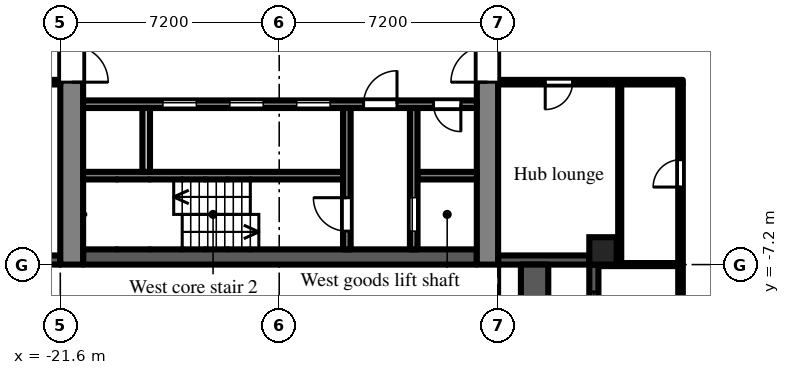
"""IFC4 building model, lengths in metres.
Left out: names, types, materials, properties, quantities, classifications, styles, units other than length and angle.
Written with IfcOpenShell. Run it as: python <this file> out.ifc"""

import sys

from ifc_helpers import new_model, si_unit, direction, frame, frame_2d, origin, origin_2d, place, context, subcontext, project, spatial, rectangle, extrude, element, fill, save


model = new_model("IFC4")
c1 = context("Model", 3, precision=1e-05, world=origin(), true_north=direction((0.0, 1.0)))
c2 = subcontext(c1, "Body", "Model", "MODEL_VIEW")
j1 = project(units=[si_unit("LENGTHUNIT", "METRE"), si_unit("PLANEANGLEUNIT", "RADIAN")], contexts=[c1])
p1 = place(None, origin())
s1 = spatial("IfcSite", under=j1, at=p1, CompositionType="ELEMENT")
p2 = place(p1, origin())
s2 = spatial("IfcBuilding", under=s1, at=p2, CompositionType="ELEMENT")
p3 = place(p2, frame((0.0, 0.0, 44.7)))
s3 = spatial("IfcBuildingStorey", under=s2, at=p3, CompositionType="ELEMENT", Elevation=44.7)
p4 = place(p3, frame((-3.75, -6.75, 0.0), z_axis=(0.0, 0.0, 1.0), x_axis=(1.0, 0.0, 0.0)))
e1 = element("IfcColumn", 1, at=p4, inside=s3, PredefinedType="COLUMN", context=c2, shape_type="SweptSolid", body=[
    extrude(rectangle(XDim=0.9, YDim=0.9, at=origin_2d()), origin(), (0.0, 0.0, 1.0), 3.0),
])
p5 = place(p3, frame((-24.3, -7.05, 0.0), z_axis=(0.0, 0.0, 1.0), x_axis=(1.0, 0.0, 0.0)))
e2 = element("IfcWall", 2, at=p5, inside=s3, PredefinedType="SOLIDWALL", context=c2, shape_type="SweptSolid", body=[
    extrude(rectangle(XDim=2.7, YDim=0.3, at=frame_2d((1.35, 0.0))), origin(), (0.0, 0.0, 1.0), 2.1),
])
p6 = place(p5, frame((0.75, 0.0, 0.2)))
e3 = element("IfcOpeningElement", 3, at=p6, cuts=e2, PredefinedType="OPENING", context=c2, shape_type="SweptSolid", body=[
    extrude(rectangle(XDim=1.2, YDim=1.85, at=frame_2d((0.6, 0.925))), frame((0.0, 0.16, 0.0), z_axis=(0.0, -1.0, 0.0), x_axis=(1.0, 0.0, 0.0)), (0.0, 0.0, 1.0), 0.32),
])
p7 = place(p3, frame((-7.2, -7.05, 0.0), z_axis=(0.0, 0.0, 1.0), x_axis=(1.0, 0.0, 0.0)))
e4 = element("IfcWall", 4, at=p7, inside=s3, PredefinedType="SOLIDWALL", context=c2, shape_type="SweptSolid", body=[
    extrude(rectangle(XDim=3.0, YDim=0.3, at=frame_2d((1.5, 0.0))), origin(), (0.0, 0.0, 1.0), 2.1),
])
p8 = place(p3, frame((-4.05, -7.2, 0.0), z_axis=(0.0, 0.0, 1.0), x_axis=(0.0, -1.0, 0.0)))
e5 = element("IfcWall", 5, at=p8, inside=s3, PredefinedType="SOLIDWALL", context=c2, shape_type="SweptSolid", body=[
    extrude(rectangle(XDim=7.2, YDim=0.3, at=frame_2d((3.6, 0.0))), origin(), (0.0, 0.0, 1.0), 2.1),
])
p9 = place(p8, frame((3.0, 0.0, 0.0)))
e6 = element("IfcOpeningElement", 6, at=p9, cuts=e5, PredefinedType="OPENING", context=c2, shape_type="SweptSolid", body=[
    extrude(rectangle(XDim=1.2, YDim=2.05, at=frame_2d((0.6, 1.025))), frame((0.0, 0.16, 0.0), z_axis=(0.0, -1.0, 0.0), x_axis=(1.0, 0.0, 0.0)), (0.0, 0.0, 1.0), 0.32),
])
p10 = place(p8, frame((0.9, 0.0, 0.2)))
e7 = element("IfcOpeningElement", 7, at=p10, cuts=e5, PredefinedType="OPENING", context=c2, shape_type="SweptSolid", body=[
    extrude(rectangle(XDim=1.8, YDim=1.85, at=frame_2d((0.9, 0.925))), frame((0.0, 0.16, 0.0), z_axis=(0.0, -1.0, 0.0), x_axis=(1.0, 0.0, 0.0)), (0.0, 0.0, 1.0), 0.32),
])
p11 = place(p8, frame((4.5, 0.0, 0.2)))
e8 = element("IfcOpeningElement", 8, at=p11, cuts=e5, PredefinedType="OPENING", context=c2, shape_type="SweptSolid", body=[
    extrude(rectangle(XDim=1.8, YDim=1.85, at=frame_2d((0.9, 0.925))), frame((0.0, 0.16, 0.0), z_axis=(0.0, -1.0, 0.0), x_axis=(1.0, 0.0, 0.0)), (0.0, 0.0, 1.0), 0.32),
])
p12 = place(p3, frame((-6.0, -14.4, 0.0), z_axis=(0.0, 0.0, 1.0), x_axis=(0.0, 1.0, 0.0)))
e9 = element("IfcWall", 9, at=p12, inside=s3, PredefinedType="PARAPET", context=c2, shape_type="SweptSolid", body=[
    extrude(rectangle(XDim=7.2, YDim=0.9, at=frame_2d((3.6, 0.0))), origin(), (0.0, 0.0, 1.0), 0.8),
])
p13 = place(p3, frame((-7.55, -7.2, 0.0), z_axis=(0.0, 0.0, 1.0), x_axis=(0.0, 1.0, 0.0)))
e10 = element("IfcWall", 10, at=p13, inside=s3, PredefinedType="SHEAR", context=c2, shape_type="SweptSolid", body=[
    extrude(rectangle(XDim=14.4, YDim=0.7, at=frame_2d((7.2, 0.0))), origin(), (0.0, 0.0, 1.0), 2.575),
])
p14 = place(p13, frame((6.0, 0.0, 0.0)))
e11 = element("IfcOpeningElement", 11, at=p14, cuts=e10, PredefinedType="OPENING", context=c2, shape_type="SweptSolid", body=[
    extrude(rectangle(XDim=2.4, YDim=2.2, at=frame_2d((1.2, 1.1))), frame((0.0, 0.36, 0.0), z_axis=(0.0, -1.0, 0.0), x_axis=(1.0, 0.0, 0.0)), (0.0, 0.0, 1.0), 0.72),
])
p15 = place(p3, frame((-21.225, -7.2, 0.0), z_axis=(0.0, 0.0, 1.0), x_axis=(0.0, 1.0, 0.0)))
e12 = element("IfcWall", 12, at=p15, inside=s3, PredefinedType="SHEAR", context=c2, shape_type="SweptSolid", body=[
    extrude(rectangle(XDim=14.4, YDim=0.75, at=frame_2d((7.2, 0.0))), origin(), (0.0, 0.0, 1.0), 2.575),
])
p16 = place(p15, frame((6.0, 0.0, 0.0)))
e13 = element("IfcOpeningElement", 13, at=p16, cuts=e12, PredefinedType="OPENING", context=c2, shape_type="SweptSolid", body=[
    extrude(rectangle(XDim=2.4, YDim=2.2, at=frame_2d((1.2, 1.1))), frame((0.0, 0.385, 0.0), z_axis=(0.0, -1.0, 0.0), x_axis=(1.0, 0.0, 0.0)), (0.0, 0.0, 1.0), 0.77),
])
p17 = place(p3, frame((-7.9, -6.95, 0.0), z_axis=(0.0, 0.0, 1.0), x_axis=(-1.0, 0.0, 0.0)))
e14 = element("IfcWall", 14, at=p17, inside=s3, PredefinedType="SHEAR", context=c2, shape_type="SweptSolid", body=[
    extrude(rectangle(XDim=12.95, YDim=0.5, at=frame_2d((6.475, 0.0))), origin(), (0.0, 0.0, 1.0), 2.575),
])
p18 = place(p3, frame((-7.9, -1.925, 0.0), z_axis=(0.0, 0.0, 1.0), x_axis=(-1.0, 0.0, 0.0)))
e15 = element("IfcWall", 15, at=p18, inside=s3, PredefinedType="SHEAR", context=c2, shape_type="SweptSolid", body=[
    extrude(rectangle(XDim=12.95, YDim=0.25, at=frame_2d((6.475, 0.0))), origin(), (0.0, 0.0, 1.0), 2.575),
])
p19 = place(p18, frame((4.825, 0.0, 0.0)))
e16 = element("IfcOpeningElement", 16, at=p19, cuts=e15, PredefinedType="OPENING", context=c2, shape_type="SweptSolid", body=[
    extrude(rectangle(XDim=1.1, YDim=2.1, at=frame_2d((0.55, 1.05))), frame((0.0, 0.135, 0.0), z_axis=(0.0, -1.0, 0.0), x_axis=(1.0, 0.0, 0.0)), (0.0, 0.0, 1.0), 0.27),
])
p20 = place(p18, frame((7.025, 0.0, 0.0)))
e17 = element("IfcOpeningElement", 17, at=p20, cuts=e15, PredefinedType="OPENING", context=c2, shape_type="SweptSolid", body=[
    extrude(rectangle(XDim=1.1, YDim=2.1, at=frame_2d((0.55, 1.05))), frame((0.0, 0.135, 0.0), z_axis=(0.0, -1.0, 0.0), x_axis=(1.0, 0.0, 0.0)), (0.0, 0.0, 1.0), 0.27),
])
p21 = place(p18, frame((9.225, 0.0, 0.0)))
e18 = element("IfcOpeningElement", 18, at=p21, cuts=e15, PredefinedType="OPENING", context=c2, shape_type="SweptSolid", body=[
    extrude(rectangle(XDim=1.1, YDim=2.1, at=frame_2d((0.55, 1.05))), frame((0.0, 0.135, 0.0), z_axis=(0.0, -1.0, 0.0), x_axis=(1.0, 0.0, 0.0)), (0.0, 0.0, 1.0), 0.27),
])
p22 = place(p18, frame((0.525, 0.0, 0.0)))
e19 = element("IfcOpeningElement", 19, at=p22, cuts=e15, PredefinedType="OPENING", context=c2, shape_type="SweptSolid", body=[
    extrude(rectangle(XDim=0.9, YDim=2.1, at=frame_2d((0.45, 1.05))), frame((0.0, 0.135, 0.0), z_axis=(0.0, -1.0, 0.0), x_axis=(1.0, 0.0, 0.0)), (0.0, 0.0, 1.0), 0.27),
])
p23 = place(p18, frame((2.625, 0.0, 0.0)))
e20 = element("IfcOpeningElement", 20, at=p23, cuts=e15, PredefinedType="OPENING", context=c2, shape_type="SweptSolid", body=[
    extrude(rectangle(XDim=1.1, YDim=2.1, at=frame_2d((0.55, 1.05))), frame((0.0, 0.135, 0.0), z_axis=(0.0, -1.0, 0.0), x_axis=(1.0, 0.0, 0.0)), (0.0, 0.0, 1.0), 0.27),
])
p24 = place(p3, frame((-7.9, -4.275, 0.0), z_axis=(0.0, 0.0, 1.0), x_axis=(-1.0, 0.0, 0.0)))
e21 = element("IfcWall", 21, at=p24, inside=s3, PredefinedType="SHEAR", context=c2, shape_type="SweptSolid", body=[
    extrude(rectangle(XDim=1.95, YDim=0.25, at=frame_2d((0.975, 0.0))), origin(), (0.0, 0.0, 1.0), 2.575),
])
p25 = place(p3, frame((-12.3, -4.275, 0.0), z_axis=(0.0, 0.0, 1.0), x_axis=(-1.0, 0.0, 0.0)))
e22 = element("IfcWall", 22, at=p25, inside=s3, PredefinedType="SHEAR", context=c2, shape_type="SweptSolid", body=[
    extrude(rectangle(XDim=8.55, YDim=0.25, at=frame_2d((4.275, 0.0))), origin(), (0.0, 0.0, 1.0), 2.575),
])
p26 = place(p3, frame((-9.975, -2.05, 0.0), z_axis=(0.0, 0.0, 1.0), x_axis=(0.0, -1.0, 0.0)))
e23 = element("IfcWall", 23, at=p26, inside=s3, PredefinedType="SHEAR", context=c2, shape_type="SweptSolid", body=[
    extrude(rectangle(XDim=4.65, YDim=0.25, at=frame_2d((2.325, 0.0))), origin(), (0.0, 0.0, 1.0), 2.575),
])
p27 = place(p26, frame((2.95, 0.0, 0.0)))
e24 = element("IfcOpeningElement", 24, at=p27, cuts=e23, PredefinedType="OPENING", context=c2, shape_type="SweptSolid", body=[
    extrude(rectangle(XDim=1.1, YDim=2.1, at=frame_2d((0.55, 1.05))), frame((0.0, 0.135, 0.0), z_axis=(0.0, -1.0, 0.0), x_axis=(1.0, 0.0, 0.0)), (0.0, 0.0, 1.0), 0.27),
])
p28 = place(p3, frame((-12.175, -2.05, 0.0), z_axis=(0.0, 0.0, 1.0), x_axis=(0.0, -1.0, 0.0)))
e25 = element("IfcWall", 25, at=p28, inside=s3, PredefinedType="SHEAR", context=c2, shape_type="SweptSolid", body=[
    extrude(rectangle(XDim=4.65, YDim=0.25, at=frame_2d((2.325, 0.0))), origin(), (0.0, 0.0, 1.0), 2.575),
])
p29 = place(p28, frame((2.95, 0.0, 0.0)))
e26 = element("IfcOpeningElement", 26, at=p29, cuts=e25, PredefinedType="OPENING", context=c2, shape_type="SweptSolid", body=[
    extrude(rectangle(XDim=1.1, YDim=2.1, at=frame_2d((0.55, 1.05))), frame((0.0, 0.135, 0.0), z_axis=(0.0, -1.0, 0.0), x_axis=(1.0, 0.0, 0.0)), (0.0, 0.0, 1.0), 0.27),
])
p30 = place(p3, frame((-18.775, -2.05, 0.0), z_axis=(0.0, 0.0, 1.0), x_axis=(0.0, -1.0, 0.0)))
e27 = element("IfcWall", 27, at=p30, inside=s3, PredefinedType="PARTITIONING", context=c2, shape_type="SweptSolid", body=[
    extrude(rectangle(XDim=2.1, YDim=0.25, at=frame_2d((1.05, 0.0))), origin(), (0.0, 0.0, 1.0), 2.575),
])
p31 = place(p3, frame((-36.5, -1.2, 0.0), z_axis=(0.0, 0.0, 1.0), x_axis=(1.0, 0.0, 0.0)))
e28 = element("IfcWall", 28, at=p31, inside=s3, PredefinedType="PARTITIONING", context=c2, shape_type="SweptSolid", body=[
    extrude(rectangle(XDim=14.9, YDim=0.15, at=frame_2d((7.45, 0.0))), origin(), (0.0, 0.0, 1.0), 2.575),
])
p32 = place(p31, frame((13.3, 0.0, 0.0)))
e29 = element("IfcOpeningElement", 29, at=p32, cuts=e28, PredefinedType="OPENING", context=c2, shape_type="SweptSolid", body=[
    extrude(rectangle(XDim=1.0, YDim=2.1, at=frame_2d((0.5, 1.05))), frame((0.0, 0.085, 0.0), z_axis=(0.0, -1.0, 0.0), x_axis=(1.0, 0.0, 0.0)), (0.0, 0.0, 1.0), 0.17),
])
p33 = place(p31, frame((4.41, 0.0, 0.0)))
e30 = element("IfcOpeningElement", 30, at=p33, cuts=e28, PredefinedType="OPENING", context=c2, shape_type="SweptSolid", body=[
    extrude(rectangle(XDim=1.0, YDim=2.1, at=frame_2d((0.5, 1.05))), frame((0.0, 0.085, 0.0), z_axis=(0.0, -1.0, 0.0), x_axis=(1.0, 0.0, 0.0)), (0.0, 0.0, 1.0), 0.17),
])
p34 = place(p31, frame((1.15, 0.0, 0.0)))
e31 = element("IfcOpeningElement", 31, at=p34, cuts=e28, PredefinedType="OPENING", context=c2, shape_type="SweptSolid", body=[
    extrude(rectangle(XDim=1.8, YDim=2.1, at=frame_2d((0.9, 1.05))), frame((0.0, 0.085, 0.0), z_axis=(0.0, -1.0, 0.0), x_axis=(1.0, 0.0, 0.0)), (0.0, 0.0, 1.0), 0.17),
])
p35 = place(p3, frame((-7.2, -1.2, 0.0), z_axis=(0.0, 0.0, 1.0), x_axis=(1.0, 0.0, 0.0)))
e32 = element("IfcWall", 32, at=p35, inside=s3, PredefinedType="PARTITIONING", context=c2, shape_type="SweptSolid", body=[
    extrude(rectangle(XDim=6.075, YDim=0.15, at=frame_2d((3.038, 0.0))), origin(), (0.0, 0.0, 1.0), 2.575),
])
p36 = place(p35, frame((1.55, 0.0, 0.0)))
e33 = element("IfcOpeningElement", 33, at=p36, cuts=e32, PredefinedType="OPENING", context=c2, shape_type="SweptSolid", body=[
    extrude(rectangle(XDim=0.9, YDim=2.1, at=frame_2d((0.45, 1.05))), frame((0.0, 0.085, 0.0), z_axis=(0.0, -1.0, 0.0), x_axis=(1.0, 0.0, 0.0)), (0.0, 0.0, 1.0), 0.17),
])
p37 = place(p3, frame((-3.9, -7.2, 0.0), z_axis=(0.0, 0.0, 1.0), x_axis=(1.0, 0.0, 0.0)))
e34 = element("IfcWall", 34, at=p37, inside=s3, PredefinedType="PARTITIONING", context=c2, shape_type="SweptSolid", body=[
    extrude(rectangle(XDim=2.625, YDim=0.1, at=frame_2d((1.312, 0.0))), origin(), (0.0, 0.0, 1.0), 2.575),
])
p38 = place(p3, frame((-3.2, -7.15, 0.0), z_axis=(0.0, 0.0, 1.0), x_axis=(0.0, 1.0, 0.0)))
e35 = element("IfcWall", 35, at=p38, inside=s3, PredefinedType="PARTITIONING", context=c2, shape_type="SweptSolid", body=[
    extrude(rectangle(XDim=5.875, YDim=0.1, at=frame_2d((2.938, 0.0))), origin(), (0.0, 0.0, 1.0), 2.575),
])
p39 = place(p3, frame((-1.2, -36.5, 0.0), z_axis=(0.0, 0.0, 1.0), x_axis=(0.0, 1.0, 0.0)))
e36 = element("IfcWall", 36, at=p39, inside=s3, PredefinedType="PARTITIONING", context=c2, shape_type="SweptSolid", body=[
    extrude(rectangle(XDim=35.225, YDim=0.15, at=frame_2d((17.613, 0.0))), origin(), (0.0, 0.0, 1.0), 2.575),
])
p40 = place(p39, frame((31.85, 0.0, 0.0)))
e37 = element("IfcOpeningElement", 37, at=p40, cuts=e36, PredefinedType="OPENING", context=c2, shape_type="SweptSolid", body=[
    extrude(rectangle(XDim=0.9, YDim=2.1, at=frame_2d((0.45, 1.05))), frame((0.0, 0.085, 0.0), z_axis=(0.0, -1.0, 0.0), x_axis=(1.0, 0.0, 0.0)), (0.0, 0.0, 1.0), 0.17),
])
p41 = place(p39, frame((27.05, 0.0, 0.0)))
e38 = element("IfcOpeningElement", 38, at=p41, cuts=e36, PredefinedType="OPENING", context=c2, shape_type="SweptSolid", body=[
    extrude(rectangle(XDim=0.9, YDim=2.1, at=frame_2d((0.45, 1.05))), frame((0.0, 0.085, 0.0), z_axis=(0.0, -1.0, 0.0), x_axis=(1.0, 0.0, 0.0)), (0.0, 0.0, 1.0), 0.17),
])
p42 = place(p39, frame((19.85, 0.0, 0.0)))
e39 = element("IfcOpeningElement", 39, at=p42, cuts=e36, PredefinedType="OPENING", context=c2, shape_type="SweptSolid", body=[
    extrude(rectangle(XDim=0.9, YDim=2.1, at=frame_2d((0.45, 1.05))), frame((0.0, 0.085, 0.0), z_axis=(0.0, -1.0, 0.0), x_axis=(1.0, 0.0, 0.0)), (0.0, 0.0, 1.0), 0.17),
])
p43 = place(p39, frame((1.55, 0.0, 0.0)))
e40 = element("IfcOpeningElement", 40, at=p43, cuts=e36, PredefinedType="OPENING", context=c2, shape_type="SweptSolid", body=[
    extrude(rectangle(XDim=1.0, YDim=2.1, at=frame_2d((0.5, 1.05))), frame((0.0, 0.085, 0.0), z_axis=(0.0, -1.0, 0.0), x_axis=(1.0, 0.0, 0.0)), (0.0, 0.0, 1.0), 0.17),
])
p44 = place(p10, origin())
e41 = element("IfcWindow", 41, at=p44, inside=s3, PartitioningType="SINGLE_PANEL", PredefinedType="WINDOW", context=c2, shape_type="SweptSolid", body=[
    extrude(rectangle(XDim=1.8, YDim=1.85, at=frame_2d((0.9, 0.925))), frame((0.0, 0.03, 0.0), z_axis=(0.0, -1.0, 0.0), x_axis=(1.0, 0.0, 0.0)), (0.0, 0.0, 1.0), 0.06),
])
fill(e7, e41)
p45 = place(p19, origin())
e42 = element("IfcDoor", 42, at=p45, inside=s3, OperationType="SLIDING_TO_LEFT", PredefinedType="DOOR", context=c2, shape_type="SweptSolid", body=[
    extrude(rectangle(XDim=1.1, YDim=2.1, at=frame_2d((0.55, 1.05))), frame((0.0, 0.025, 0.0), z_axis=(0.0, -1.0, 0.0), x_axis=(1.0, 0.0, 0.0)), (0.0, 0.0, 1.0), 0.05),
])
fill(e16, e42)
p46 = place(p20, origin())
e43 = element("IfcDoor", 43, at=p46, inside=s3, OperationType="SLIDING_TO_LEFT", PredefinedType="DOOR", context=c2, shape_type="SweptSolid", body=[
    extrude(rectangle(XDim=1.1, YDim=2.1, at=frame_2d((0.55, 1.05))), frame((0.0, 0.025, 0.0), z_axis=(0.0, -1.0, 0.0), x_axis=(1.0, 0.0, 0.0)), (0.0, 0.0, 1.0), 0.05),
])
fill(e17, e43)
p47 = place(p21, origin())
e44 = element("IfcDoor", 44, at=p47, inside=s3, OperationType="SLIDING_TO_LEFT", PredefinedType="DOOR", context=c2, shape_type="SweptSolid", body=[
    extrude(rectangle(XDim=1.1, YDim=2.1, at=frame_2d((0.55, 1.05))), frame((0.0, 0.025, 0.0), z_axis=(0.0, -1.0, 0.0), x_axis=(1.0, 0.0, 0.0)), (0.0, 0.0, 1.0), 0.05),
])
fill(e18, e44)
p48 = place(p27, origin())
e45 = element("IfcDoor", 45, at=p48, inside=s3, OperationType="SLIDING_TO_LEFT", PredefinedType="DOOR", context=c2, shape_type="SweptSolid", body=[
    extrude(rectangle(XDim=1.1, YDim=2.1, at=frame_2d((0.55, 1.05))), frame((0.0, 0.025, 0.0), z_axis=(0.0, -1.0, 0.0), x_axis=(1.0, 0.0, 0.0)), (0.0, 0.0, 1.0), 0.05),
])
fill(e24, e45)
p49 = place(p29, frame((1.1, 0.0, 0.0), z_axis=(0.0, 0.0, 1.0), x_axis=(-1.0, 0.0, 0.0)))
e46 = element("IfcDoor", 46, at=p49, inside=s3, OperationType="SINGLE_SWING_RIGHT", PredefinedType="DOOR", context=c2, shape_type="SweptSolid", body=[
    extrude(rectangle(XDim=1.1, YDim=2.1, at=frame_2d((0.55, 1.05))), frame((0.0, 0.025, 0.0), z_axis=(0.0, -1.0, 0.0), x_axis=(1.0, 0.0, 0.0)), (0.0, 0.0, 1.0), 0.05),
])
fill(e26, e46)
p50 = place(p22, origin())
e47 = element("IfcDoor", 47, at=p50, inside=s3, OperationType="SINGLE_SWING_LEFT", PredefinedType="DOOR", context=c2, shape_type="SweptSolid", body=[
    extrude(rectangle(XDim=0.9, YDim=2.1, at=frame_2d((0.45, 1.05))), frame((0.0, 0.025, 0.0), z_axis=(0.0, -1.0, 0.0), x_axis=(1.0, 0.0, 0.0)), (0.0, 0.0, 1.0), 0.05),
])
fill(e19, e47)
p51 = place(p23, frame((1.1, 0.0, 0.0), z_axis=(0.0, 0.0, 1.0), x_axis=(-1.0, 0.0, 0.0)))
e48 = element("IfcDoor", 48, at=p51, inside=s3, OperationType="SINGLE_SWING_RIGHT", PredefinedType="DOOR", context=c2, shape_type="SweptSolid", body=[
    extrude(rectangle(XDim=1.1, YDim=2.1, at=frame_2d((0.55, 1.05))), frame((0.0, 0.025, 0.0), z_axis=(0.0, -1.0, 0.0), x_axis=(1.0, 0.0, 0.0)), (0.0, 0.0, 1.0), 0.05),
])
fill(e20, e48)
p52 = place(p14, origin())
e49 = element("IfcDoor", 49, at=p52, inside=s3, OperationType="DOUBLE_DOOR_DOUBLE_SWING", PredefinedType="DOOR", context=c2, shape_type="SweptSolid", body=[
    extrude(rectangle(XDim=2.4, YDim=2.2, at=frame_2d((1.2, 1.1))), frame((0.0, 0.025, 0.0), z_axis=(0.0, -1.0, 0.0), x_axis=(1.0, 0.0, 0.0)), (0.0, 0.0, 1.0), 0.05),
])
fill(e11, e49)
p53 = place(p16, frame((2.4, 0.0, 0.0), z_axis=(0.0, 0.0, 1.0), x_axis=(-1.0, 0.0, 0.0)))
e50 = element("IfcDoor", 50, at=p53, inside=s3, OperationType="DOUBLE_DOOR_DOUBLE_SWING", PredefinedType="DOOR", context=c2, shape_type="SweptSolid", body=[
    extrude(rectangle(XDim=2.4, YDim=2.2, at=frame_2d((1.2, 1.1))), frame((0.0, 0.025, 0.0), z_axis=(0.0, -1.0, 0.0), x_axis=(1.0, 0.0, 0.0)), (0.0, 0.0, 1.0), 0.05),
])
fill(e13, e50)
p54 = place(p40, origin())
e51 = element("IfcDoor", 51, at=p54, inside=s3, OperationType="SINGLE_SWING_LEFT", PredefinedType="DOOR", context=c2, shape_type="SweptSolid", body=[
    extrude(rectangle(XDim=0.9, YDim=2.1, at=frame_2d((0.45, 1.05))), frame((0.0, 0.025, 0.0), z_axis=(0.0, -1.0, 0.0), x_axis=(1.0, 0.0, 0.0)), (0.0, 0.0, 1.0), 0.05),
])
fill(e37, e51)
p55 = place(p36, frame((0.9, 0.0, 0.0), z_axis=(0.0, 0.0, 1.0), x_axis=(-1.0, 0.0, 0.0)))
e52 = element("IfcDoor", 52, at=p55, inside=s3, OperationType="SINGLE_SWING_RIGHT", PredefinedType="DOOR", context=c2, shape_type="SweptSolid", body=[
    extrude(rectangle(XDim=0.9, YDim=2.1, at=frame_2d((0.45, 1.05))), frame((0.0, 0.025, 0.0), z_axis=(0.0, -1.0, 0.0), x_axis=(1.0, 0.0, 0.0)), (0.0, 0.0, 1.0), 0.05),
])
fill(e33, e52)
save(model, sys.argv[1])
